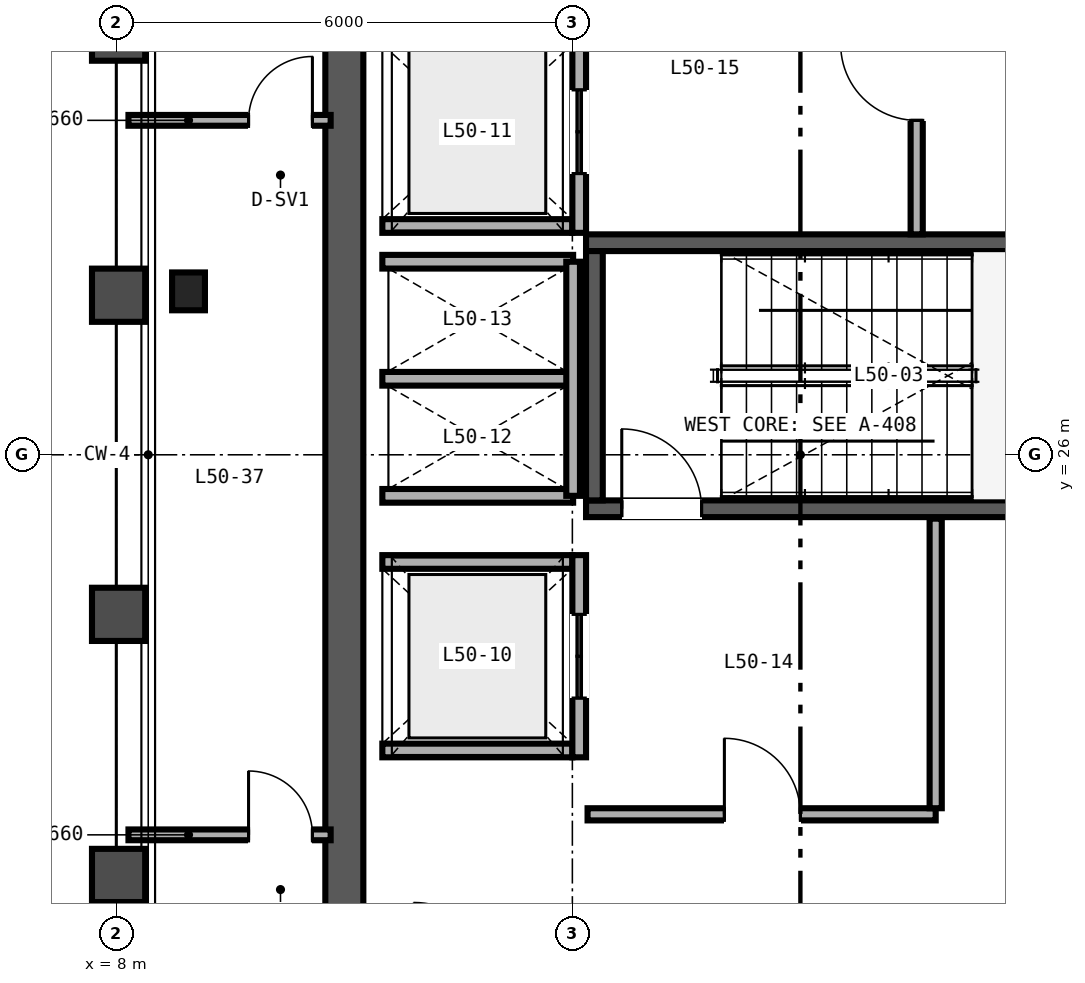
"""IFC4 building model, lengths in metres.
Left out: names, types, materials, properties, quantities, classifications, styles, units other than length and angle.
Written with IfcOpenShell. Run it as: python <this file> out.ifc"""

import sys

from ifc_helpers import new_model, si_unit, direction, frame, frame_2d, origin, origin_2d, place, context, subcontext, project, spatial, rectangle, i_section, extrude, source, transform, mapped, element, fill, save


model = new_model("IFC4")
c1 = context("Model", 3, precision=1e-05, world=origin(), true_north=direction((0.0, 1.0)))
c2 = subcontext(c1, "Body", "Model", "MODEL_VIEW")
j1 = project(units=[si_unit("LENGTHUNIT", "METRE"), si_unit("PLANEANGLEUNIT", "RADIAN")], contexts=[c1])
p1 = place(None, origin())
s1 = spatial("IfcSite", under=j1, at=p1, CompositionType="ELEMENT")
p2 = place(p1, origin())
s2 = spatial("IfcBuilding", under=s1, at=p2, CompositionType="ELEMENT")
p3 = place(p2, frame((0.0, 0.0, 199.2)))
s3 = spatial("IfcBuildingStorey", under=s2, at=p3, CompositionType="ELEMENT", Elevation=199.2)
p4 = place(p3, frame((11.0, 15.25, 0.0), z_axis=(0.0, 0.0, 1.0), x_axis=(0.0, 1.0, 0.0)))
e1 = element("IfcWall", 1, at=p4, inside=s3, PredefinedType="SHEAR", context=c2, shape_type="SweptSolid", body=[
    extrude(rectangle(XDim=21.5, YDim=0.5, at=frame_2d((10.75, 0.0))), origin(), (0.0, 0.0, 1.0), 3.37),
])
p5 = place(p3, frame((14.18, 25.29, 0.0), z_axis=(0.0, 0.0, 1.0), x_axis=(1.0, 0.0, 0.0)))
e2 = element("IfcWall", 2, at=p5, inside=s3, PredefinedType="SHEAR", context=c2, shape_type="SweptSolid", body=[
    extrude(rectangle(XDim=8.57, YDim=0.22, at=frame_2d((4.285, 0.0))), origin(), (0.0, 0.0, 1.0), 3.4),
])
p6 = place(p5, frame((0.47, 0.0, 0.0)))
e3 = element("IfcOpeningElement", 3, at=p6, cuts=e2, PredefinedType="OPENING", context=c2, shape_type="SweptSolid", body=[
    extrude(rectangle(XDim=1.05, YDim=2.15, at=frame_2d((0.525, 1.075))), frame((0.0, 0.12, 0.0), z_axis=(0.0, -1.0, 0.0), x_axis=(1.0, 0.0, 0.0)), (0.0, 0.0, 1.0), 0.24),
])
p7 = place(p3, frame((14.18, 28.79, 0.0), z_axis=(0.0, 0.0, 1.0), x_axis=(1.0, 0.0, 0.0)))
e4 = element("IfcWall", 4, at=p7, inside=s3, PredefinedType="SHEAR", context=c2, shape_type="SweptSolid", body=[
    extrude(rectangle(XDim=8.57, YDim=0.22, at=frame_2d((4.285, 0.0))), origin(), (0.0, 0.0, 1.0), 3.4),
])
p8 = place(p3, frame((14.29, 25.4, 0.0), z_axis=(0.0, 0.0, 1.0), x_axis=(0.0, 1.0, 0.0)))
e5 = element("IfcWall", 5, at=p8, inside=s3, PredefinedType="SHEAR", context=c2, shape_type="SweptSolid", body=[
    extrude(rectangle(XDim=3.28, YDim=0.22, at=frame_2d((1.64, 0.0))), origin(), (0.0, 0.0, 1.0), 3.4),
])
m1 = source(origin(), c2, "Body", "SweptSolid", [
    extrude(i_section(OverallWidth=0.432, OverallDepth=0.498, WebThickness=0.056, FlangeThickness=0.089, FilletRadius=0.025, at=origin_2d()), origin(), (0.0, 0.0, 1.0), 3.37),
])
p9 = place(p3, frame((8.95, 28.15, 0.0), z_axis=(0.0, 0.0, 1.0), x_axis=(1.0, 0.0, 0.0)))
e6 = element("IfcColumn", 6, at=p9, inside=s3, PredefinedType="COLUMN", context=c2, shape_type="MappedRepresentation", body=[
    mapped(m1, transform((0.0, 0.0, 0.0), scale=1.0)),
])
for number, where, z_axis, x_axis in (
    (7, (11.5, 22.11, 0.0), (0.0, 0.0, 1.0), (1.0, 0.0, 0.0)),
    (8, (11.5, 24.59, 0.0), (0.0, 0.0, 1.0), (1.0, 0.0, 0.0)),
):
    element("IfcWall", number, at=place(p3, frame(where, z_axis=z_axis, x_axis=x_axis)), inside=s3, PredefinedType="SOLIDWALL", context=c2, shape_type="SweptSolid", body=[
        extrude(rectangle(XDim=2.5, YDim=0.18, at=frame_2d((1.25, 0.0))), origin(), (0.0, 0.0, 1.0), 3.37),
    ])
p10 = place(p3, frame((14.09, 22.02, 0.0), z_axis=(0.0, 0.0, 1.0), x_axis=(0.0, 1.0, 0.0)))
e9 = element("IfcWall", 9, at=p10, inside=s3, PredefinedType="SOLIDWALL", context=c2, shape_type="SweptSolid", body=[
    extrude(rectangle(XDim=2.66, YDim=0.18, at=frame_2d((1.33, 0.0))), origin(), (0.0, 0.0, 1.0), 3.37),
])
p11 = place(p10, frame((0.78, 0.0, 0.0)))
e10 = element("IfcOpeningElement", 10, at=p11, cuts=e9, PredefinedType="OPENING", context=c2, shape_type="SweptSolid", body=[
    extrude(rectangle(XDim=1.1, YDim=2.2, at=frame_2d((0.55, 1.1))), frame((0.0, 0.1, 0.0), z_axis=(0.0, -1.0, 0.0), x_axis=(1.0, 0.0, 0.0)), (0.0, 0.0, 1.0), 0.2),
])
p12 = place(p3, frame((11.5, 29.01, 0.0), z_axis=(0.0, 0.0, 1.0), x_axis=(1.0, 0.0, 0.0)))
e11 = element("IfcWall", 11, at=p12, inside=s3, PredefinedType="SOLIDWALL", context=c2, shape_type="SweptSolid", body=[
    extrude(rectangle(XDim=2.5, YDim=0.18, at=frame_2d((1.25, 0.0))), origin(), (0.0, 0.0, 1.0), 3.37),
])
p13 = place(p3, frame((14.09, 28.92, 0.0), z_axis=(0.0, 0.0, 1.0), x_axis=(0.0, 1.0, 0.0)))
e12 = element("IfcWall", 12, at=p13, inside=s3, PredefinedType="SOLIDWALL", context=c2, shape_type="SweptSolid", body=[
    extrude(rectangle(XDim=2.66, YDim=0.18, at=frame_2d((1.33, 0.0))), origin(), (0.0, 0.0, 1.0), 3.37),
])
p14 = place(p13, frame((0.78, 0.0, 0.0)))
e13 = element("IfcOpeningElement", 13, at=p14, cuts=e12, PredefinedType="OPENING", context=c2, shape_type="SweptSolid", body=[
    extrude(rectangle(XDim=1.1, YDim=2.2, at=frame_2d((0.55, 1.1))), frame((0.0, 0.1, 0.0), z_axis=(0.0, -1.0, 0.0), x_axis=(1.0, 0.0, 0.0)), (0.0, 0.0, 1.0), 0.2),
])
for number, where, z_axis, x_axis in (
    (14, (11.5, 25.46, 0.0), (0.0, 0.0, 1.0), (1.0, 0.0, 0.0)),
    (15, (11.5, 27.0, 0.0), (0.0, 0.0, 1.0), (1.0, 0.0, 0.0)),
    (16, (11.5, 28.54, 0.0), (0.0, 0.0, 1.0), (1.0, 0.0, 0.0)),
):
    element("IfcWall", number, at=place(p3, frame(where, z_axis=z_axis, x_axis=x_axis)), inside=s3, PredefinedType="SOLIDWALL", context=c2, shape_type="SweptSolid", body=[
        extrude(rectangle(XDim=2.51, YDim=0.18, at=frame_2d((1.255, 0.0))), origin(), (0.0, 0.0, 1.0), 3.37),
    ])
p15 = place(p3, frame((14.01, 25.46, 0.0), z_axis=(0.0, 0.0, 1.0), x_axis=(0.0, 1.0, 0.0)))
e17 = element("IfcWall", 17, at=p15, inside=s3, PredefinedType="SOLIDWALL", context=c2, shape_type="SweptSolid", body=[
    extrude(rectangle(XDim=3.08, YDim=0.18, at=frame_2d((1.54, 0.0))), origin(), (0.0, 0.0, 1.0), 3.37),
])
p16 = place(p3, frame((14.2, 21.27, 0.0), z_axis=(0.0, 0.0, 1.0), x_axis=(1.0, 0.0, 0.0)))
e18 = element("IfcWall", 18, at=p16, inside=s3, PredefinedType="PARTITIONING", context=c2, shape_type="SweptSolid", body=[
    extrude(rectangle(XDim=4.58, YDim=0.16, at=frame_2d((2.29, 0.0))), origin(), (0.0, 0.0, 1.0), 3.37),
])
p17 = place(p16, frame((1.8, 0.0, 0.0)))
e19 = element("IfcOpeningElement", 19, at=p17, cuts=e18, PredefinedType="OPENING", context=c2, shape_type="SweptSolid", body=[
    extrude(rectangle(XDim=1.0, YDim=2.15, at=frame_2d((0.5, 1.075))), frame((0.0, 0.09, 0.0), z_axis=(0.0, -1.0, 0.0), x_axis=(1.0, 0.0, 0.0)), (0.0, 0.0, 1.0), 0.18),
])
p18 = place(p3, frame((18.78, 21.35, 0.0), z_axis=(0.0, 0.0, 1.0), x_axis=(0.0, 1.0, 0.0)))
e20 = element("IfcWall", 20, at=p18, inside=s3, PredefinedType="PARTITIONING", context=c2, shape_type="SweptSolid", body=[
    extrude(rectangle(XDim=3.81, YDim=0.16, at=frame_2d((1.905, 0.0))), origin(), (0.0, 0.0, 1.0), 3.37),
])
p19 = place(p3, frame((18.53, 28.9, 0.0), z_axis=(0.0, 0.0, 1.0), x_axis=(0.0, 1.0, 0.0)))
e21 = element("IfcWall", 21, at=p19, inside=s3, PredefinedType="PARTITIONING", context=c2, shape_type="SweptSolid", body=[
    extrude(rectangle(XDim=3.9, YDim=0.16, at=frame_2d((1.95, 0.0))), origin(), (0.0, 0.0, 1.0), 3.37),
])
p20 = place(p19, frame((1.5, 0.0, 0.0)))
e22 = element("IfcOpeningElement", 22, at=p20, cuts=e21, PredefinedType="OPENING", context=c2, shape_type="SweptSolid", body=[
    extrude(rectangle(XDim=1.0, YDim=2.15, at=frame_2d((0.5, 1.075))), frame((0.0, 0.09, 0.0), z_axis=(0.0, -1.0, 0.0), x_axis=(1.0, 0.0, 0.0)), (0.0, 0.0, 1.0), 0.18),
])
p21 = place(p3, frame((8.16, 21.0, 0.0), z_axis=(0.0, 0.0, 1.0), x_axis=(1.0, 0.0, 0.0)))
e23 = element("IfcWall", 23, at=p21, inside=s3, PredefinedType="PARTITIONING", context=c2, shape_type="SweptSolid", body=[
    extrude(rectangle(XDim=2.66, YDim=0.142, at=frame_2d((1.33, 0.0))), origin(), (0.0, 0.0, 1.0), 2.47),
])
p22 = place(p21, frame((1.58, 0.0, 0.0)))
e24 = element("IfcOpeningElement", 24, at=p22, cuts=e23, PredefinedType="OPENING", context=c2, shape_type="SweptSolid", body=[
    extrude(rectangle(XDim=0.84, YDim=2.1, at=frame_2d((0.42, 1.05))), frame((0.0, 0.081, 0.0), z_axis=(0.0, -1.0, 0.0), x_axis=(1.0, 0.0, 0.0)), (0.0, 0.0, 1.0), 0.162),
])
p23 = place(p3, frame((8.16, 30.4, 0.0), z_axis=(0.0, 0.0, 1.0), x_axis=(1.0, 0.0, 0.0)))
e25 = element("IfcWall", 25, at=p23, inside=s3, PredefinedType="PARTITIONING", context=c2, shape_type="SweptSolid", body=[
    extrude(rectangle(XDim=2.66, YDim=0.142, at=frame_2d((1.33, 0.0))), origin(), (0.0, 0.0, 1.0), 2.753),
])
p24 = place(p23, frame((1.58, 0.0, 0.0)))
e26 = element("IfcOpeningElement", 26, at=p24, cuts=e25, PredefinedType="OPENING", context=c2, shape_type="SweptSolid", body=[
    extrude(rectangle(XDim=0.84, YDim=2.1, at=frame_2d((0.42, 1.05))), frame((0.0, 0.081, 0.0), z_axis=(0.0, -1.0, 0.0), x_axis=(1.0, 0.0, 0.0)), (0.0, 0.0, 1.0), 0.162),
])
m2 = source(origin(), c2, "Body", "SweptSolid", [
    extrude(rectangle(XDim=1.05, YDim=2.15, at=frame_2d((0.525, 1.075))), frame((0.0, 0.025, 0.0), z_axis=(0.0, -1.0, 0.0), x_axis=(1.0, 0.0, 0.0)), (0.0, 0.0, 1.0), 0.05),
])
p25 = place(p6, origin())
e27 = element("IfcDoor", 27, at=p25, inside=s3, OperationType="SINGLE_SWING_LEFT", PredefinedType="DOOR", context=c2, shape_type="MappedRepresentation", body=[
    mapped(m2, transform((0.0, 0.0, 0.0), scale=1.0)),
])
fill(e3, e27)
m3 = source(origin(), c2, "Body", "SweptSolid", [
    extrude(rectangle(XDim=1.1, YDim=2.2, at=frame_2d((0.55, 1.1))), frame((0.0, 0.025, 0.0), z_axis=(0.0, -1.0, 0.0), x_axis=(1.0, 0.0, 0.0)), (0.0, 0.0, 1.0), 0.05),
])
p26 = place(p11, origin())
e28 = element("IfcDoor", 28, at=p26, inside=s3, OperationType="DOUBLE_DOOR_SLIDING", PredefinedType="DOOR", context=c2, shape_type="MappedRepresentation", body=[
    mapped(m3, transform((0.0, 0.0, 0.0), scale=1.0)),
])
fill(e10, e28)
p27 = place(p14, origin())
e29 = element("IfcDoor", 29, at=p27, inside=s3, OperationType="DOUBLE_DOOR_SLIDING", PredefinedType="DOOR", context=c2, shape_type="MappedRepresentation", body=[
    mapped(m3, transform((0.0, 0.0, 0.0), scale=1.0)),
])
fill(e13, e29)
m4 = source(origin(), c2, "Body", "SweptSolid", [
    extrude(rectangle(XDim=1.0, YDim=2.15, at=frame_2d((0.5, 1.075))), frame((0.0, 0.025, 0.0), z_axis=(0.0, -1.0, 0.0), x_axis=(1.0, 0.0, 0.0)), (0.0, 0.0, 1.0), 0.05),
])
p28 = place(p17, origin())
e30 = element("IfcDoor", 30, at=p28, inside=s3, OperationType="SINGLE_SWING_LEFT", PredefinedType="DOOR", context=c2, shape_type="MappedRepresentation", body=[
    mapped(m4, transform((0.0, 0.0, 0.0), scale=1.0)),
])
fill(e19, e30)
p29 = place(p20, origin())
e31 = element("IfcDoor", 31, at=p29, inside=s3, OperationType="SINGLE_SWING_RIGHT", PredefinedType="DOOR", context=c2, shape_type="MappedRepresentation", body=[
    mapped(m4, transform((0.0, 0.0, 0.0), scale=1.0)),
])
fill(e22, e31)
m5 = source(origin(), c2, "Body", "SweptSolid", [
    extrude(rectangle(XDim=0.84, YDim=2.1, at=frame_2d((0.42, 1.05))), frame((0.0, 0.025, 0.0), z_axis=(0.0, -1.0, 0.0), x_axis=(1.0, 0.0, 0.0)), (0.0, 0.0, 1.0), 0.05),
])
p30 = place(p22, origin())
e32 = element("IfcDoor", 32, at=p30, inside=s3, OperationType="SINGLE_SWING_LEFT", PredefinedType="DOOR", context=c2, shape_type="MappedRepresentation", body=[
    mapped(m5, transform((0.0, 0.0, 0.0), scale=1.0)),
])
fill(e24, e32)
p31 = place(p24, origin())
e33 = element("IfcDoor", 33, at=p31, inside=s3, OperationType="SINGLE_SWING_RIGHT", PredefinedType="DOOR", context=c2, shape_type="MappedRepresentation", body=[
    mapped(m5, transform((0.0, 0.0, 0.0), scale=1.0)),
])
fill(e26, e33)
save(model, sys.argv[1])
